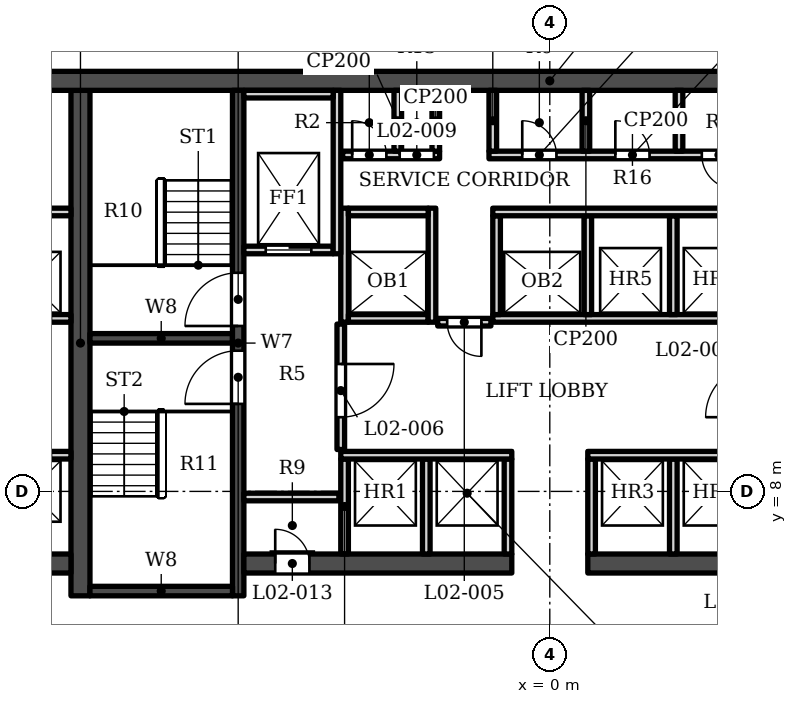
"""IFC4 building model, lengths in metres.
Left out: names, types, materials, properties, quantities, classifications, styles, units other than length and angle.
Written with IfcOpenShell. Run it as: python <this file> out.ifc"""

import sys

from ifc_helpers import new_model, si_unit, direction, frame, frame_2d, origin, place, context, subcontext, project, spatial, rectangle, extrude, element, fill, save


model = new_model("IFC4")
c1 = context("Model", 3, precision=1e-05, world=origin(), true_north=direction((0.0, 1.0)))
c2 = subcontext(c1, "Body", "Model", "MODEL_VIEW")
j1 = project(units=[si_unit("LENGTHUNIT", "METRE"), si_unit("PLANEANGLEUNIT", "RADIAN")], contexts=[c1])
p1 = place(None, origin())
s1 = spatial("IfcSite", under=j1, at=p1, CompositionType="ELEMENT")
p2 = place(p1, origin())
s2 = spatial("IfcBuilding", under=s1, at=p2, CompositionType="ELEMENT")
p3 = place(p2, frame((0.0, 0.0, 20.0)))
s3 = spatial("IfcBuildingStorey", under=s2, at=p3, CompositionType="ELEMENT", Elevation=20.0)
p4 = place(p3, frame((-16.9, 18.802, 0.0), z_axis=(0.0, 0.0, 1.0), x_axis=(1.0, 0.0, 0.0)))
e1 = element("IfcWall", 1, at=p4, inside=s3, PredefinedType="SHEAR", context=c2, shape_type="SweptSolid", body=[
    extrude(rectangle(XDim=33.8, YDim=0.5, at=frame_2d((16.9, 0.0))), origin(), (0.0, 0.0, 1.0), 9.0),
])
p5 = place(p3, frame((-12.35, 5.253, 0.0), z_axis=(0.0, 0.0, 1.0), x_axis=(0.0, 1.0, 0.0)))
e2 = element("IfcWall", 2, at=p5, inside=s3, PredefinedType="SHEAR", context=c2, shape_type="SweptSolid", body=[
    extrude(rectangle(XDim=13.3, YDim=0.5, at=frame_2d((6.65, 0.0))), origin(), (0.0, 0.0, 1.0), 9.0),
])
p6 = place(p3, frame((-8.2, 5.253, 0.0), z_axis=(0.0, 0.0, 1.0), x_axis=(0.0, 1.0, 0.0)))
e3 = element("IfcWall", 3, at=p6, inside=s3, PredefinedType="SHEAR", context=c2, shape_type="SweptSolid", body=[
    extrude(rectangle(XDim=13.3, YDim=0.3, at=frame_2d((6.65, 0.0))), origin(), (0.0, 0.0, 1.0), 9.0),
])
p7 = place(p6, frame((7.1, 0.0, 0.0)))
e4 = element("IfcOpeningElement", 4, at=p7, cuts=e3, PredefinedType="OPENING", context=c2, shape_type="SweptSolid", body=[
    extrude(rectangle(XDim=1.4, YDim=2.1, at=frame_2d((0.7, 1.05))), frame((0.0, 0.16, 0.0), z_axis=(0.0, -1.0, 0.0), x_axis=(1.0, 0.0, 0.0)), (0.0, 0.0, 1.0), 0.32),
])
p8 = place(p6, frame((5.05, 0.0, 0.0)))
e5 = element("IfcOpeningElement", 5, at=p8, cuts=e3, PredefinedType="OPENING", context=c2, shape_type="SweptSolid", body=[
    extrude(rectangle(XDim=1.4, YDim=2.1, at=frame_2d((0.7, 1.05))), frame((0.0, 0.16, 0.0), z_axis=(0.0, -1.0, 0.0), x_axis=(1.0, 0.0, 0.0)), (0.0, 0.0, 1.0), 0.32),
])
for number, where, z_axis, x_axis in (
    (6, (-12.1, 12.028, 0.0), (0.0, 0.0, 1.0), (1.0, 0.0, 0.0)),
    (7, (-12.1, 5.378, 0.0), (0.0, 0.0, 1.0), (1.0, 0.0, 0.0)),
):
    element("IfcWall", number, at=place(p3, frame(where, z_axis=z_axis, x_axis=x_axis)), inside=s3, PredefinedType="SHEAR", context=c2, shape_type="SweptSolid", body=[
        extrude(rectangle(XDim=3.75, YDim=0.25, at=frame_2d((1.875, 0.0))), origin(), (0.0, 0.0, 1.0), 9.0),
    ])
p9 = place(p3, frame((-8.05, 6.103, 0.0), z_axis=(0.0, 0.0, 1.0), x_axis=(1.0, 0.0, 0.0)))
e8 = element("IfcWall", 8, at=p9, inside=s3, PredefinedType="SHEAR", context=c2, shape_type="SweptSolid", body=[
    extrude(rectangle(XDim=7.05, YDim=0.5, at=frame_2d((3.525, 0.0))), origin(), (0.0, 0.0, 1.0), 9.0),
])
p10 = place(p9, frame((0.825, 0.0, 0.0)))
e9 = element("IfcOpeningElement", 9, at=p10, cuts=e8, PredefinedType="OPENING", context=c2, shape_type="SweptSolid", body=[
    extrude(rectangle(XDim=0.9, YDim=2.1, at=frame_2d((0.45, 1.05))), frame((0.0, 0.26, 0.0), z_axis=(0.0, -1.0, 0.0), x_axis=(1.0, 0.0, 0.0)), (0.0, 0.0, 1.0), 0.52),
])
p11 = place(p3, frame((1.0, 6.103, 0.0), z_axis=(0.0, 0.0, 1.0), x_axis=(1.0, 0.0, 0.0)))
e10 = element("IfcWall", 10, at=p11, inside=s3, PredefinedType="SHEAR", context=c2, shape_type="SweptSolid", body=[
    extrude(rectangle(XDim=7.05, YDim=0.5, at=frame_2d((3.525, 0.0))), origin(), (0.0, 0.0, 1.0), 9.0),
])
p12 = place(p11, frame((5.325, 0.0, 0.0)))
e11 = element("IfcOpeningElement", 11, at=p12, cuts=e10, PredefinedType="OPENING", context=c2, shape_type="SweptSolid", body=[
    extrude(rectangle(XDim=0.9, YDim=2.1, at=frame_2d((0.45, 1.05))), frame((0.0, 0.26, 0.0), z_axis=(0.0, -1.0, 0.0), x_axis=(1.0, 0.0, 0.0)), (0.0, 0.0, 1.0), 0.52),
])
p13 = place(p3, frame((-12.6, 6.103, 0.0), z_axis=(0.0, 0.0, 1.0), x_axis=(-1.0, 0.0, 0.0)))
e12 = element("IfcWall", 12, at=p13, inside=s3, PredefinedType="SHEAR", context=c2, shape_type="SweptSolid", body=[
    extrude(rectangle(XDim=4.3, YDim=0.5, at=frame_2d((2.15, 0.0))), origin(), (0.0, 0.0, 1.0), 9.0),
])
for number, where, z_axis, x_axis in (
    (13, (-5.4, 6.353, 0.0), (0.0, 0.0, 1.0), (0.0, 1.0, 0.0)),
    (14, (-3.25, 6.353, 0.0), (0.0, 0.0, 1.0), (0.0, 1.0, 0.0)),
    (15, (-1.1, 6.353, 0.0), (0.0, 0.0, 1.0), (0.0, 1.0, 0.0)),
    (16, (1.1, 6.353, 0.0), (0.0, 0.0, 1.0), (0.0, 1.0, 0.0)),
    (17, (3.25, 6.353, 0.0), (0.0, 0.0, 1.0), (0.0, 1.0, 0.0)),
    (18, (-8.05, 7.853, 0.0), (0.0, 0.0, 1.0), (1.0, 0.0, 0.0)),
):
    element("IfcWall", number, at=place(p3, frame(where, z_axis=z_axis, x_axis=x_axis)), inside=s3, PredefinedType="SOLIDWALL", context=c2, shape_type="SweptSolid", body=[
        extrude(rectangle(XDim=2.5, YDim=0.2, at=frame_2d((1.25, 0.0))), origin(), (0.0, 0.0, 1.0), 8.55),
    ])
p14 = place(p3, frame((-16.9, 8.953, 0.0), z_axis=(0.0, 0.0, 1.0), x_axis=(1.0, 0.0, 0.0)))
e19 = element("IfcWall", 19, at=p14, inside=s3, PredefinedType="SOLIDWALL", context=c2, shape_type="SweptSolid", body=[
    extrude(rectangle(XDim=4.3, YDim=0.2, at=frame_2d((2.15, 0.0))), origin(), (0.0, 0.0, 1.0), 8.55),
])
p15 = place(p14, frame((2.675, 0.0, 0.0)))
e20 = element("IfcOpeningElement", 20, at=p15, cuts=e19, PredefinedType="OPENING", context=c2, shape_type="SweptSolid", body=[
    extrude(rectangle(XDim=1.1, YDim=2.1, at=frame_2d((0.55, 1.05))), frame((0.0, 0.11, 0.0), z_axis=(0.0, -1.0, 0.0), x_axis=(1.0, 0.0, 0.0)), (0.0, 0.0, 1.0), 0.22),
])
p16 = place(p14, frame((0.425, 0.0, 0.0)))
e21 = element("IfcOpeningElement", 21, at=p16, cuts=e19, PredefinedType="OPENING", context=c2, shape_type="SweptSolid", body=[
    extrude(rectangle(XDim=1.1, YDim=2.1, at=frame_2d((0.55, 1.05))), frame((0.0, 0.11, 0.0), z_axis=(0.0, -1.0, 0.0), x_axis=(1.0, 0.0, 0.0)), (0.0, 0.0, 1.0), 0.22),
])
for number, where, z_axis, x_axis in (
    (22, (-5.5, 8.953, 0.0), (0.0, 0.0, 1.0), (1.0, 0.0, 0.0)),
    (23, (1.0, 8.953, 0.0), (0.0, 0.0, 1.0), (1.0, 0.0, 0.0)),
):
    element("IfcWall", number, at=place(p3, frame(where, z_axis=z_axis, x_axis=x_axis)), inside=s3, PredefinedType="SOLIDWALL", context=c2, shape_type="SweptSolid", body=[
        extrude(rectangle(XDim=4.5, YDim=0.2, at=frame_2d((2.25, 0.0))), origin(), (0.0, 0.0, 1.0), 8.55),
    ])
p17 = place(p3, frame((-5.5, 9.103, 0.0), z_axis=(0.0, 0.0, 1.0), x_axis=(0.0, 1.0, 0.0)))
e24 = element("IfcWall", 24, at=p17, inside=s3, PredefinedType="SOLIDWALL", context=c2, shape_type="SweptSolid", body=[
    extrude(rectangle(XDim=3.3, YDim=0.2, at=frame_2d((1.65, 0.0))), origin(), (0.0, 0.0, 1.0), 8.55),
])
p18 = place(p17, frame((0.85, 0.0, 0.0)))
e25 = element("IfcOpeningElement", 25, at=p18, cuts=e24, PredefinedType="OPENING", context=c2, shape_type="SweptSolid", body=[
    extrude(rectangle(XDim=1.4, YDim=2.1, at=frame_2d((0.7, 1.05))), frame((0.0, 0.11, 0.0), z_axis=(0.0, -1.0, 0.0), x_axis=(1.0, 0.0, 0.0)), (0.0, 0.0, 1.0), 0.22),
])
p19 = place(p3, frame((-2.95, 12.453, 0.0), z_axis=(0.0, 0.0, 1.0), x_axis=(1.0, 0.0, 0.0)))
e26 = element("IfcWall", 26, at=p19, inside=s3, PredefinedType="SOLIDWALL", context=c2, shape_type="SweptSolid", body=[
    extrude(rectangle(XDim=1.4, YDim=0.2, at=frame_2d((0.7, 0.0))), origin(), (0.0, 0.0, 1.0), 8.55),
])
p20 = place(p19, frame((0.25, 0.0, 0.0)))
e27 = element("IfcOpeningElement", 27, at=p20, cuts=e26, PredefinedType="OPENING", context=c2, shape_type="SweptSolid", body=[
    extrude(rectangle(XDim=0.9, YDim=2.1, at=frame_2d((0.45, 1.05))), frame((0.0, 0.11, 0.0), z_axis=(0.0, -1.0, 0.0), x_axis=(1.0, 0.0, 0.0)), (0.0, 0.0, 1.0), 0.22),
])
p21 = place(p3, frame((-16.9, 12.552, 0.0), z_axis=(0.0, 0.0, 1.0), x_axis=(1.0, 0.0, 0.0)))
e28 = element("IfcWall", 28, at=p21, inside=s3, PredefinedType="SOLIDWALL", context=c2, shape_type="SweptSolid", body=[
    extrude(rectangle(XDim=4.3, YDim=0.2, at=frame_2d((2.15, 0.0))), origin(), (0.0, 0.0, 1.0), 8.55),
])
p22 = place(p21, frame((2.675, 0.0, 0.0)))
e29 = element("IfcOpeningElement", 29, at=p22, cuts=e28, PredefinedType="OPENING", context=c2, shape_type="SweptSolid", body=[
    extrude(rectangle(XDim=1.1, YDim=2.1, at=frame_2d((0.55, 1.05))), frame((0.0, 0.11, 0.0), z_axis=(0.0, -1.0, 0.0), x_axis=(1.0, 0.0, 0.0)), (0.0, 0.0, 1.0), 0.22),
])
p23 = place(p21, frame((0.425, 0.0, 0.0)))
e30 = element("IfcOpeningElement", 30, at=p23, cuts=e28, PredefinedType="OPENING", context=c2, shape_type="SweptSolid", body=[
    extrude(rectangle(XDim=1.1, YDim=2.1, at=frame_2d((0.55, 1.05))), frame((0.0, 0.11, 0.0), z_axis=(0.0, -1.0, 0.0), x_axis=(1.0, 0.0, 0.0)), (0.0, 0.0, 1.0), 0.22),
])
p24 = place(p3, frame((-5.4, 12.453, 0.0), z_axis=(0.0, 0.0, 1.0), x_axis=(0.0, 1.0, 0.0)))
e31 = element("IfcWall", 31, at=p24, inside=s3, PredefinedType="SOLIDWALL", context=c2, shape_type="SweptSolid", body=[
    extrude(rectangle(XDim=3.0, YDim=0.2, at=frame_2d((1.5, 0.0))), origin(), (0.0, 0.0, 1.0), 8.55),
])
p25 = place(p3, frame((-5.3, 12.552, 0.0), z_axis=(0.0, 0.0, 1.0), x_axis=(1.0, 0.0, 0.0)))
e32 = element("IfcWall", 32, at=p25, inside=s3, PredefinedType="SOLIDWALL", context=c2, shape_type="SweptSolid", body=[
    extrude(rectangle(XDim=2.1, YDim=0.2, at=frame_2d((1.05, 0.0))), origin(), (0.0, 0.0, 1.0), 8.55),
])
p26 = place(p3, frame((-3.1, 12.453, 0.0), z_axis=(0.0, 0.0, 1.0), x_axis=(0.0, 1.0, 0.0)))
e33 = element("IfcWall", 33, at=p26, inside=s3, PredefinedType="SOLIDWALL", context=c2, shape_type="SweptSolid", body=[
    extrude(rectangle(XDim=3.0, YDim=0.2, at=frame_2d((1.5, 0.0))), origin(), (0.0, 0.0, 1.0), 8.55),
])
p27 = place(p3, frame((-1.5, 12.552, 0.0), z_axis=(0.0, 0.0, 1.0), x_axis=(1.0, 0.0, 0.0)))
e34 = element("IfcWall", 34, at=p27, inside=s3, PredefinedType="SOLIDWALL", context=c2, shape_type="SweptSolid", body=[
    extrude(rectangle(XDim=7.0, YDim=0.2, at=frame_2d((3.5, 0.0))), origin(), (0.0, 0.0, 1.0), 8.55),
])
for number, where, z_axis, x_axis in (
    (35, (-1.4, 12.653, 0.0), (0.0, 0.0, 1.0), (0.0, 1.0, 0.0)),
    (36, (1.0, 12.653, 0.0), (0.0, 0.0, 1.0), (0.0, 1.0, 0.0)),
    (37, (3.25, 12.653, 0.0), (0.0, 0.0, 1.0), (0.0, 1.0, 0.0)),
):
    element("IfcWall", number, at=place(p3, frame(where, z_axis=z_axis, x_axis=x_axis)), inside=s3, PredefinedType="SOLIDWALL", context=c2, shape_type="SweptSolid", body=[
        extrude(rectangle(XDim=2.6, YDim=0.2, at=frame_2d((1.3, 0.0))), origin(), (0.0, 0.0, 1.0), 8.55),
    ])
p28 = place(p3, frame((-8.05, 14.353, 0.0), z_axis=(0.0, 0.0, 1.0), x_axis=(1.0, 0.0, 0.0)))
e38 = element("IfcWall", 38, at=p28, inside=s3, PredefinedType="SOLIDWALL", context=c2, shape_type="SweptSolid", body=[
    extrude(rectangle(XDim=2.35, YDim=0.2, at=frame_2d((1.175, 0.0))), origin(), (0.0, 0.0, 1.0), 8.55),
])
p29 = place(p28, frame((0.575, 0.0, 0.0)))
e39 = element("IfcOpeningElement", 39, at=p29, cuts=e38, PredefinedType="OPENING", context=c2, shape_type="SweptSolid", body=[
    extrude(rectangle(XDim=1.2, YDim=2.1, at=frame_2d((0.6, 1.05))), frame((0.0, 0.11, 0.0), z_axis=(0.0, -1.0, 0.0), x_axis=(1.0, 0.0, 0.0)), (0.0, 0.0, 1.0), 0.22),
])
for number, where, z_axis, x_axis in (
    (40, (-5.6, 14.253, 0.0), (0.0, 0.0, 1.0), (0.0, 1.0, 0.0)),
    (41, (-16.9, 15.353, 0.0), (0.0, 0.0, 1.0), (1.0, 0.0, 0.0)),
):
    element("IfcWall", number, at=place(p3, frame(where, z_axis=z_axis, x_axis=x_axis)), inside=s3, PredefinedType="SOLIDWALL", context=c2, shape_type="SweptSolid", body=[
        extrude(rectangle(XDim=4.3, YDim=0.2, at=frame_2d((2.15, 0.0))), origin(), (0.0, 0.0, 1.0), 8.55),
    ])
p30 = place(p3, frame((-5.3, 15.353, 0.0), z_axis=(0.0, 0.0, 1.0), x_axis=(1.0, 0.0, 0.0)))
e42 = element("IfcWall", 42, at=p30, inside=s3, PredefinedType="SOLIDWALL", context=c2, shape_type="SweptSolid", body=[
    extrude(rectangle(XDim=2.1, YDim=0.2, at=frame_2d((1.05, 0.0))), origin(), (0.0, 0.0, 1.0), 8.55),
])
p31 = place(p3, frame((-1.5, 15.353, 0.0), z_axis=(0.0, 0.0, 1.0), x_axis=(1.0, 0.0, 0.0)))
e43 = element("IfcWall", 43, at=p31, inside=s3, PredefinedType="SOLIDWALL", context=c2, shape_type="SweptSolid", body=[
    extrude(rectangle(XDim=7.2, YDim=0.2, at=frame_2d((3.6, 0.0))), origin(), (0.0, 0.0, 1.0), 8.55),
])
p32 = place(p3, frame((-5.45, 16.853, 0.0), z_axis=(0.0, 0.0, 1.0), x_axis=(1.0, 0.0, 0.0)))
e44 = element("IfcWall", 44, at=p32, inside=s3, PredefinedType="SOLIDWALL", context=c2, shape_type="SweptSolid", body=[
    extrude(rectangle(XDim=2.55, YDim=0.2, at=frame_2d((1.275, 0.0))), origin(), (0.0, 0.0, 1.0), 8.55),
])
p33 = place(p32, frame((0.25, 0.0, 0.0)))
e45 = element("IfcOpeningElement", 45, at=p33, cuts=e44, PredefinedType="OPENING", context=c2, shape_type="SweptSolid", body=[
    extrude(rectangle(XDim=0.9, YDim=2.1, at=frame_2d((0.45, 1.05))), frame((0.0, 0.11, 0.0), z_axis=(0.0, -1.0, 0.0), x_axis=(1.0, 0.0, 0.0)), (0.0, 0.0, 1.0), 0.22),
])
p34 = place(p32, frame((1.5, 0.0, 0.0)))
e46 = element("IfcOpeningElement", 46, at=p34, cuts=e44, PredefinedType="OPENING", context=c2, shape_type="SweptSolid", body=[
    extrude(rectangle(XDim=0.9, YDim=2.1, at=frame_2d((0.45, 1.05))), frame((0.0, 0.11, 0.0), z_axis=(0.0, -1.0, 0.0), x_axis=(1.0, 0.0, 0.0)), (0.0, 0.0, 1.0), 0.22),
])
p35 = place(p3, frame((-1.6, 16.853, 0.0), z_axis=(0.0, 0.0, 1.0), x_axis=(1.0, 0.0, 0.0)))
e47 = element("IfcWall", 47, at=p35, inside=s3, PredefinedType="SOLIDWALL", context=c2, shape_type="SweptSolid", body=[
    extrude(rectangle(XDim=7.05, YDim=0.2, at=frame_2d((3.525, 0.0))), origin(), (0.0, 0.0, 1.0), 8.55),
])
p36 = place(p35, frame((0.875, 0.0, 0.0)))
e48 = element("IfcOpeningElement", 48, at=p36, cuts=e47, PredefinedType="OPENING", context=c2, shape_type="SweptSolid", body=[
    extrude(rectangle(XDim=0.9, YDim=2.1, at=frame_2d((0.45, 1.05))), frame((0.0, 0.11, 0.0), z_axis=(0.0, -1.0, 0.0), x_axis=(1.0, 0.0, 0.0)), (0.0, 0.0, 1.0), 0.22),
])
p37 = place(p35, frame((3.325, 0.0, 0.0)))
e49 = element("IfcOpeningElement", 49, at=p37, cuts=e47, PredefinedType="OPENING", context=c2, shape_type="SweptSolid", body=[
    extrude(rectangle(XDim=0.9, YDim=2.1, at=frame_2d((0.45, 1.05))), frame((0.0, 0.11, 0.0), z_axis=(0.0, -1.0, 0.0), x_axis=(1.0, 0.0, 0.0)), (0.0, 0.0, 1.0), 0.22),
])
p38 = place(p35, frame((5.6, 0.0, 0.0)))
e50 = element("IfcOpeningElement", 50, at=p38, cuts=e47, PredefinedType="OPENING", context=c2, shape_type="SweptSolid", body=[
    extrude(rectangle(XDim=0.9, YDim=2.1, at=frame_2d((0.45, 1.05))), frame((0.0, 0.11, 0.0), z_axis=(0.0, -1.0, 0.0), x_axis=(1.0, 0.0, 0.0)), (0.0, 0.0, 1.0), 0.22),
])
for number, where, z_axis, x_axis in (
    (51, (-4.0, 16.953, 0.0), (0.0, 0.0, 1.0), (0.0, 1.0, 0.0)),
    (52, (-3.0, 16.953, 0.0), (0.0, 0.0, 1.0), (0.0, 1.0, 0.0)),
    (53, (-1.5, 16.953, 0.0), (0.0, 0.0, 1.0), (0.0, 1.0, 0.0)),
    (54, (0.95, 16.953, 0.0), (0.0, 0.0, 1.0), (0.0, 1.0, 0.0)),
    (55, (3.4, 16.953, 0.0), (0.0, 0.0, 1.0), (0.0, 1.0, 0.0)),
):
    element("IfcWall", number, at=place(p3, frame(where, z_axis=z_axis, x_axis=x_axis)), inside=s3, PredefinedType="PARTITIONING", context=c2, shape_type="SweptSolid", body=[
        extrude(rectangle(XDim=1.6, YDim=0.2, at=frame_2d((0.8, 0.0))), origin(), (0.0, 0.0, 1.0), 8.55),
    ])
p39 = place(p3, frame((-8.05, 18.453, 0.0), z_axis=(0.0, 0.0, 1.0), x_axis=(1.0, 0.0, 0.0)))
e56 = element("IfcWall", 56, at=p39, inside=s3, PredefinedType="SOLIDWALL", context=c2, shape_type="SweptSolid", body=[
    extrude(rectangle(XDim=2.35, YDim=0.2, at=frame_2d((1.175, 0.0))), origin(), (0.0, 0.0, 1.0), 8.55),
])
p40 = place(p29, origin())
e57 = element("IfcDoor", 57, at=p40, inside=s3, OperationType="DOUBLE_DOOR_SLIDING", PredefinedType="DOOR", context=c2, shape_type="SweptSolid", body=[
    extrude(rectangle(XDim=1.2, YDim=2.1, at=frame_2d((0.6, 1.05))), frame((0.0, 0.025, 0.0), z_axis=(0.0, -1.0, 0.0), x_axis=(1.0, 0.0, 0.0)), (0.0, 0.0, 1.0), 0.05),
])
fill(e39, e57)
p41 = place(p7, origin())
e58 = element("IfcDoor", 58, at=p41, inside=s3, OperationType="SINGLE_SWING_LEFT", PredefinedType="DOOR", context=c2, shape_type="SweptSolid", body=[
    extrude(rectangle(XDim=1.4, YDim=2.1, at=frame_2d((0.7, 1.05))), frame((0.0, 0.025, 0.0), z_axis=(0.0, -1.0, 0.0), x_axis=(1.0, 0.0, 0.0)), (0.0, 0.0, 1.0), 0.05),
])
fill(e4, e58)
p42 = place(p8, origin())
e59 = element("IfcDoor", 59, at=p42, inside=s3, OperationType="SINGLE_SWING_LEFT", PredefinedType="DOOR", context=c2, shape_type="SweptSolid", body=[
    extrude(rectangle(XDim=1.4, YDim=2.1, at=frame_2d((0.7, 1.05))), frame((0.0, 0.025, 0.0), z_axis=(0.0, -1.0, 0.0), x_axis=(1.0, 0.0, 0.0)), (0.0, 0.0, 1.0), 0.05),
])
fill(e5, e59)
p43 = place(p20, origin())
e60 = element("IfcDoor", 60, at=p43, inside=s3, OperationType="SINGLE_SWING_RIGHT", PredefinedType="DOOR", context=c2, shape_type="SweptSolid", body=[
    extrude(rectangle(XDim=0.9, YDim=2.1, at=frame_2d((0.45, 1.05))), frame((0.0, 0.025, 0.0), z_axis=(0.0, -1.0, 0.0), x_axis=(1.0, 0.0, 0.0)), (0.0, 0.0, 1.0), 0.05),
])
fill(e27, e60)
p44 = place(p18, origin())
e61 = element("IfcDoor", 61, at=p44, inside=s3, OperationType="SINGLE_SWING_RIGHT", PredefinedType="DOOR", context=c2, shape_type="SweptSolid", body=[
    extrude(rectangle(XDim=1.4, YDim=2.1, at=frame_2d((0.7, 1.05))), frame((0.0, 0.025, 0.0), z_axis=(0.0, -1.0, 0.0), x_axis=(1.0, 0.0, 0.0)), (0.0, 0.0, 1.0), 0.05),
])
fill(e25, e61)
p45 = place(p33, origin())
e62 = element("IfcDoor", 62, at=p45, inside=s3, OperationType="SINGLE_SWING_LEFT", PredefinedType="DOOR", context=c2, shape_type="SweptSolid", body=[
    extrude(rectangle(XDim=0.9, YDim=2.1, at=frame_2d((0.45, 1.05))), frame((0.0, 0.025, 0.0), z_axis=(0.0, -1.0, 0.0), x_axis=(1.0, 0.0, 0.0)), (0.0, 0.0, 1.0), 0.05),
])
fill(e45, e62)
p46 = place(p34, origin())
e63 = element("IfcDoor", 63, at=p46, inside=s3, OperationType="SINGLE_SWING_LEFT", PredefinedType="DOOR", context=c2, shape_type="SweptSolid", body=[
    extrude(rectangle(XDim=0.9, YDim=2.1, at=frame_2d((0.45, 1.05))), frame((0.0, 0.025, 0.0), z_axis=(0.0, -1.0, 0.0), x_axis=(1.0, 0.0, 0.0)), (0.0, 0.0, 1.0), 0.05),
])
fill(e46, e63)
p47 = place(p36, origin())
e64 = element("IfcDoor", 64, at=p47, inside=s3, OperationType="SINGLE_SWING_LEFT", PredefinedType="DOOR", context=c2, shape_type="SweptSolid", body=[
    extrude(rectangle(XDim=0.9, YDim=2.1, at=frame_2d((0.45, 1.05))), frame((0.0, 0.025, 0.0), z_axis=(0.0, -1.0, 0.0), x_axis=(1.0, 0.0, 0.0)), (0.0, 0.0, 1.0), 0.05),
])
fill(e48, e64)
p48 = place(p37, origin())
e65 = element("IfcDoor", 65, at=p48, inside=s3, OperationType="SINGLE_SWING_LEFT", PredefinedType="DOOR", context=c2, shape_type="SweptSolid", body=[
    extrude(rectangle(XDim=0.9, YDim=2.1, at=frame_2d((0.45, 1.05))), frame((0.0, 0.025, 0.0), z_axis=(0.0, -1.0, 0.0), x_axis=(1.0, 0.0, 0.0)), (0.0, 0.0, 1.0), 0.05),
])
fill(e49, e65)
p49 = place(p38, origin())
e66 = element("IfcDoor", 66, at=p49, inside=s3, OperationType="SINGLE_SWING_RIGHT", PredefinedType="DOOR", context=c2, shape_type="SweptSolid", body=[
    extrude(rectangle(XDim=0.9, YDim=2.1, at=frame_2d((0.45, 1.05))), frame((0.0, 0.025, 0.0), z_axis=(0.0, -1.0, 0.0), x_axis=(1.0, 0.0, 0.0)), (0.0, 0.0, 1.0), 0.05),
])
fill(e50, e66)
p50 = place(p10, origin())
e67 = element("IfcDoor", 67, at=p50, inside=s3, OperationType="SINGLE_SWING_LEFT", PredefinedType="DOOR", context=c2, shape_type="SweptSolid", body=[
    extrude(rectangle(XDim=0.9, YDim=2.1, at=frame_2d((0.45, 1.05))), frame((0.0, 0.025, 0.0), z_axis=(0.0, -1.0, 0.0), x_axis=(1.0, 0.0, 0.0)), (0.0, 0.0, 1.0), 0.05),
])
fill(e9, e67)
save(model, sys.argv[1])
